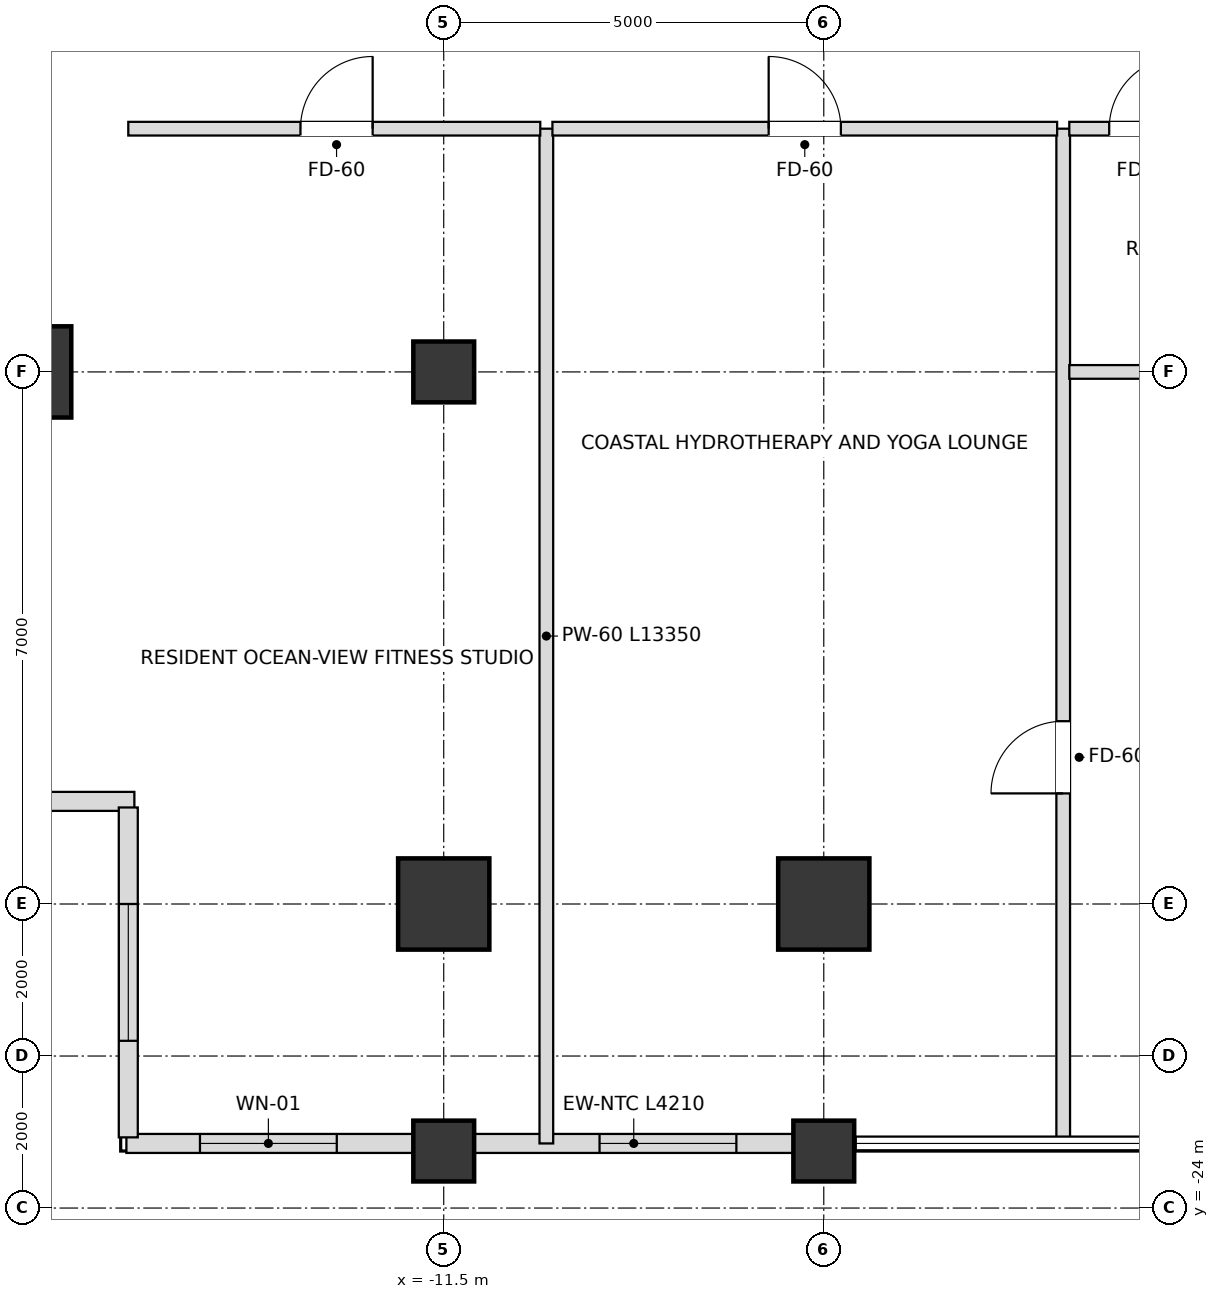
"""IFC4 building model, lengths in metres.
Left out: names, types, materials, properties, quantities, classifications, styles, units other than length and angle.
Written with IfcOpenShell. Run it as: python <this file> out.ifc"""

import sys

from ifc_helpers import new_model, si_unit, direction, frame, frame_2d, origin, origin_2d, place, context, subcontext, project, spatial, rectangle, extrude, element, fill, save


model = new_model("IFC4")
c1 = context("Model", 3, precision=1e-05, world=origin(), true_north=direction((0.0, 1.0)))
c2 = subcontext(c1, "Body", "Model", "MODEL_VIEW")
j1 = project(units=[si_unit("LENGTHUNIT", "METRE"), si_unit("PLANEANGLEUNIT", "RADIAN")], contexts=[c1])
p1 = place(None, origin())
s1 = spatial("IfcSite", under=j1, at=p1, CompositionType="ELEMENT")
p2 = place(p1, origin())
s2 = spatial("IfcBuilding", under=s1, at=p2, CompositionType="ELEMENT")
p3 = place(p2, frame((0.0, 0.0, 147.6)))
s3 = spatial("IfcBuildingStorey", under=s2, at=p3, CompositionType="ELEMENT", Elevation=147.6)
for number, where, z_axis, x_axis in (
    (1, (-11.5, -20.0, 0.0), (0.0, 0.0, 1.0), (1.0, 0.0, 0.0)),
    (2, (-6.5, -20.0, 0.0), (0.0, 0.0, 1.0), (1.0, 0.0, 0.0)),
    (3, (-17.0, -13.0, 0.0), (0.0, 0.0, 1.0), (1.0, 0.0, 0.0)),
):
    element("IfcColumn", number, at=place(p3, frame(where, z_axis=z_axis, x_axis=x_axis)), inside=s3, PredefinedType="USERDEFINED", context=c2, shape_type="SweptSolid", body=[
        extrude(rectangle(XDim=1.2, YDim=1.2, at=origin_2d()), origin(), (0.0, 0.0, 1.0), 3.6),
    ])
for number, where, z_axis, x_axis in (
    (4, (-11.5, -13.0, 0.0), (0.0, 0.0, 1.0), (1.0, 0.0, 0.0)),
    (5, (-11.5, -23.25, 0.0), (0.0, 0.0, 1.0), (1.0, 0.0, 0.0)),
    (6, (-6.5, -23.25, 0.0), (0.0, 0.0, 1.0), (1.0, 0.0, 0.0)),
):
    element("IfcColumn", number, at=place(p3, frame(where, z_axis=z_axis, x_axis=x_axis)), inside=s3, PredefinedType="COLUMN", context=c2, shape_type="SweptSolid", body=[
        extrude(rectangle(XDim=0.8, YDim=0.8, at=origin_2d()), origin(), (0.0, 0.0, 1.0), 3.6),
    ])
p4 = place(p3, frame((-15.675, -23.15, 0.0), z_axis=(0.0, 0.0, 1.0), x_axis=(1.0, 0.0, 0.0)))
e7 = element("IfcWall", 7, at=p4, inside=s3, PredefinedType="SOLIDWALL", context=c2, shape_type="SweptSolid", body=[
    extrude(rectangle(XDim=3.78, YDim=0.25, at=frame_2d((1.89, 0.0))), origin(), (0.0, 0.0, 1.0), 2.736),
])
p5 = place(p4, frame((0.968, 0.0, 0.72)))
e8 = element("IfcOpeningElement", 8, at=p5, cuts=e7, PredefinedType="OPENING", context=c2, shape_type="SweptSolid", body=[
    extrude(rectangle(XDim=1.8, YDim=1.68, at=frame_2d((0.9, 0.84))), frame((0.0, 0.135, 0.0), z_axis=(0.0, -1.0, 0.0), x_axis=(1.0, 0.0, 0.0)), (0.0, 0.0, 1.0), 0.27),
])
p6 = place(p3, frame((-11.105, -23.15, 0.0), z_axis=(0.0, 0.0, 1.0), x_axis=(1.0, 0.0, 0.0)))
e9 = element("IfcWall", 9, at=p6, inside=s3, PredefinedType="SOLIDWALL", context=c2, shape_type="SweptSolid", body=[
    extrude(rectangle(XDim=4.21, YDim=0.25, at=frame_2d((2.105, 0.0))), origin(), (0.0, 0.0, 1.0), 2.736),
])
p7 = place(p6, frame((1.655, 0.0, 0.72)))
e10 = element("IfcOpeningElement", 10, at=p7, cuts=e9, PredefinedType="OPENING", context=c2, shape_type="SweptSolid", body=[
    extrude(rectangle(XDim=1.8, YDim=1.68, at=frame_2d((0.9, 0.84))), frame((0.0, 0.135, 0.0), z_axis=(0.0, -1.0, 0.0), x_axis=(1.0, 0.0, 0.0)), (0.0, 0.0, 1.0), 0.27),
])
p8 = place(p3, frame((-20.23, -18.65, 0.0), z_axis=(0.0, 0.0, 1.0), x_axis=(1.0, 0.0, 0.0)))
e11 = element("IfcWall", 11, at=p8, inside=s3, PredefinedType="SOLIDWALL", context=c2, shape_type="SweptSolid", body=[
    extrude(rectangle(XDim=4.66, YDim=0.25, at=frame_2d((2.33, 0.0))), origin(), (0.0, 0.0, 1.0), 2.736),
])
p9 = place(p8, frame((1.43, 0.0, 0.72)))
e12 = element("IfcOpeningElement", 12, at=p9, cuts=e11, PredefinedType="OPENING", context=c2, shape_type="SweptSolid", body=[
    extrude(rectangle(XDim=1.8, YDim=1.68, at=frame_2d((0.9, 0.84))), frame((0.0, 0.135, 0.0), z_axis=(0.0, -1.0, 0.0), x_axis=(1.0, 0.0, 0.0)), (0.0, 0.0, 1.0), 0.27),
])
p10 = place(p3, frame((-15.65, -18.73, 0.0), z_axis=(0.0, 0.0, 1.0), x_axis=(0.0, -1.0, 0.0)))
e13 = element("IfcWall", 13, at=p10, inside=s3, PredefinedType="SOLIDWALL", context=c2, shape_type="SweptSolid", body=[
    extrude(rectangle(XDim=4.34, YDim=0.25, at=frame_2d((2.17, 0.0))), origin(), (0.0, 0.0, 1.0), 2.736),
])
p11 = place(p10, frame((1.27, 0.0, 0.72)))
e14 = element("IfcOpeningElement", 14, at=p11, cuts=e13, PredefinedType="OPENING", context=c2, shape_type="SweptSolid", body=[
    extrude(rectangle(XDim=1.8, YDim=1.68, at=frame_2d((0.9, 0.84))), frame((0.0, 0.135, 0.0), z_axis=(0.0, -1.0, 0.0), x_axis=(1.0, 0.0, 0.0)), (0.0, 0.0, 1.0), 0.27),
])
p12 = place(p3, frame((-10.15, -23.15, 0.0), z_axis=(0.0, 0.0, 1.0), x_axis=(0.0, 1.0, 0.0)))
e15 = element("IfcWall", 15, at=p12, inside=s3, PredefinedType="PARTITIONING", context=c2, shape_type="SweptSolid", body=[
    extrude(rectangle(XDim=13.35, YDim=0.18, at=frame_2d((6.675, 0.0))), origin(), (0.0, 0.0, 1.0), 2.816),
])
p13 = place(p3, frame((-3.35, -23.15, 0.0), z_axis=(0.0, 0.0, 1.0), x_axis=(0.0, 1.0, 0.0)))
e16 = element("IfcWall", 16, at=p13, inside=s3, PredefinedType="PARTITIONING", context=c2, shape_type="SweptSolid", body=[
    extrude(rectangle(XDim=13.35, YDim=0.18, at=frame_2d((6.675, 0.0))), origin(), (0.0, 0.0, 1.0), 2.816),
])
p14 = place(p13, frame((4.605, 0.0, 0.0)))
e17 = element("IfcOpeningElement", 17, at=p14, cuts=e16, PredefinedType="OPENING", context=c2, shape_type="SweptSolid", body=[
    extrude(rectangle(XDim=0.95, YDim=2.15, at=frame_2d((0.475, 1.075))), frame((0.0, 0.1, 0.0), z_axis=(0.0, -1.0, 0.0), x_axis=(1.0, 0.0, 0.0)), (0.0, 0.0, 1.0), 0.2),
])
p15 = place(p3, frame((-3.27, -13.0, 0.0), z_axis=(0.0, 0.0, 1.0), x_axis=(1.0, 0.0, 0.0)))
e18 = element("IfcWall", 18, at=p15, inside=s3, PredefinedType="PARTITIONING", context=c2, shape_type="SweptSolid", body=[
    extrude(rectangle(XDim=1.99, YDim=0.18, at=frame_2d((0.995, 0.0))), origin(), (0.0, 0.0, 1.0), 3.38),
])
p16 = place(p3, frame((-15.65, -9.8, 0.0), z_axis=(0.0, 0.0, 1.0), x_axis=(1.0, 0.0, 0.0)))
e19 = element("IfcWall", 19, at=p16, inside=s3, PredefinedType="PARTITIONING", context=c2, shape_type="SweptSolid", body=[
    extrude(rectangle(XDim=5.42, YDim=0.18, at=frame_2d((2.71, 0.0))), origin(), (0.0, 0.0, 1.0), 3.38),
])
p17 = place(p16, frame((2.265, 0.0, 0.0)))
e20 = element("IfcOpeningElement", 20, at=p17, cuts=e19, PredefinedType="OPENING", context=c2, shape_type="SweptSolid", body=[
    extrude(rectangle(XDim=0.95, YDim=2.15, at=frame_2d((0.475, 1.075))), frame((0.0, 0.1, 0.0), z_axis=(0.0, -1.0, 0.0), x_axis=(1.0, 0.0, 0.0)), (0.0, 0.0, 1.0), 0.2),
])
p18 = place(p3, frame((-10.07, -9.8, 0.0), z_axis=(0.0, 0.0, 1.0), x_axis=(1.0, 0.0, 0.0)))
e21 = element("IfcWall", 21, at=p18, inside=s3, PredefinedType="PARTITIONING", context=c2, shape_type="SweptSolid", body=[
    extrude(rectangle(XDim=6.64, YDim=0.18, at=frame_2d((3.32, 0.0))), origin(), (0.0, 0.0, 1.0), 2.816),
])
p19 = place(p18, frame((2.845, 0.0, 0.0)))
e22 = element("IfcOpeningElement", 22, at=p19, cuts=e21, PredefinedType="OPENING", context=c2, shape_type="SweptSolid", body=[
    extrude(rectangle(XDim=0.95, YDim=2.15, at=frame_2d((0.475, 1.075))), frame((0.0, 0.1, 0.0), z_axis=(0.0, -1.0, 0.0), x_axis=(1.0, 0.0, 0.0)), (0.0, 0.0, 1.0), 0.2),
])
p20 = place(p3, frame((-3.27, -9.8, 0.0), z_axis=(0.0, 0.0, 1.0), x_axis=(1.0, 0.0, 0.0)))
e23 = element("IfcWall", 23, at=p20, inside=s3, PredefinedType="PARTITIONING", context=c2, shape_type="SweptSolid", body=[
    extrude(rectangle(XDim=1.99, YDim=0.18, at=frame_2d((0.995, 0.0))), origin(), (0.0, 0.0, 1.0), 3.38),
])
p21 = place(p20, frame((0.525, 0.0, 0.0)))
e24 = element("IfcOpeningElement", 24, at=p21, cuts=e23, PredefinedType="OPENING", context=c2, shape_type="SweptSolid", body=[
    extrude(rectangle(XDim=0.95, YDim=2.15, at=frame_2d((0.475, 1.075))), frame((0.0, 0.1, 0.0), z_axis=(0.0, -1.0, 0.0), x_axis=(1.0, 0.0, 0.0)), (0.0, 0.0, 1.0), 0.2),
])
p22 = place(p5, origin())
e25 = element("IfcWindow", 25, at=p22, inside=s3, PartitioningType="SINGLE_PANEL", PredefinedType="WINDOW", context=c2, shape_type="SweptSolid", body=[
    extrude(rectangle(XDim=1.8, YDim=1.68, at=frame_2d((0.9, 0.84))), frame((0.0, 0.03, 0.0), z_axis=(0.0, -1.0, 0.0), x_axis=(1.0, 0.0, 0.0)), (0.0, 0.0, 1.0), 0.06),
])
fill(e8, e25)
p23 = place(p7, origin())
e26 = element("IfcWindow", 26, at=p23, inside=s3, PartitioningType="SINGLE_PANEL", PredefinedType="WINDOW", context=c2, shape_type="SweptSolid", body=[
    extrude(rectangle(XDim=1.8, YDim=1.68, at=frame_2d((0.9, 0.84))), frame((0.0, 0.03, 0.0), z_axis=(0.0, -1.0, 0.0), x_axis=(1.0, 0.0, 0.0)), (0.0, 0.0, 1.0), 0.06),
])
fill(e10, e26)
p24 = place(p11, origin())
e27 = element("IfcWindow", 27, at=p24, inside=s3, PartitioningType="SINGLE_PANEL", PredefinedType="WINDOW", context=c2, shape_type="SweptSolid", body=[
    extrude(rectangle(XDim=1.8, YDim=1.68, at=frame_2d((0.9, 0.84))), frame((0.0, 0.03, 0.0), z_axis=(0.0, -1.0, 0.0), x_axis=(1.0, 0.0, 0.0)), (0.0, 0.0, 1.0), 0.06),
])
fill(e14, e27)
p25 = place(p21, origin())
e28 = element("IfcDoor", 28, at=p25, inside=s3, OperationType="SINGLE_SWING_RIGHT", PredefinedType="DOOR", context=c2, shape_type="SweptSolid", body=[
    extrude(rectangle(XDim=0.95, YDim=2.15, at=frame_2d((0.475, 1.075))), frame((0.0, 0.025, 0.0), z_axis=(0.0, -1.0, 0.0), x_axis=(1.0, 0.0, 0.0)), (0.0, 0.0, 1.0), 0.05),
])
fill(e24, e28)
p26 = place(p14, origin())
e29 = element("IfcDoor", 29, at=p26, inside=s3, OperationType="SINGLE_SWING_LEFT", PredefinedType="DOOR", context=c2, shape_type="SweptSolid", body=[
    extrude(rectangle(XDim=0.95, YDim=2.15, at=frame_2d((0.475, 1.075))), frame((0.0, 0.025, 0.0), z_axis=(0.0, -1.0, 0.0), x_axis=(1.0, 0.0, 0.0)), (0.0, 0.0, 1.0), 0.05),
])
fill(e17, e29)
p27 = place(p17, origin())
e30 = element("IfcDoor", 30, at=p27, inside=s3, OperationType="SINGLE_SWING_RIGHT", PredefinedType="DOOR", context=c2, shape_type="SweptSolid", body=[
    extrude(rectangle(XDim=0.95, YDim=2.15, at=frame_2d((0.475, 1.075))), frame((0.0, 0.025, 0.0), z_axis=(0.0, -1.0, 0.0), x_axis=(1.0, 0.0, 0.0)), (0.0, 0.0, 1.0), 0.05),
])
fill(e20, e30)
p28 = place(p19, origin())
e31 = element("IfcDoor", 31, at=p28, inside=s3, OperationType="SINGLE_SWING_LEFT", PredefinedType="DOOR", context=c2, shape_type="SweptSolid", body=[
    extrude(rectangle(XDim=0.95, YDim=2.15, at=frame_2d((0.475, 1.075))), frame((0.0, 0.025, 0.0), z_axis=(0.0, -1.0, 0.0), x_axis=(1.0, 0.0, 0.0)), (0.0, 0.0, 1.0), 0.05),
])
fill(e22, e31)
save(model, sys.argv[1])
